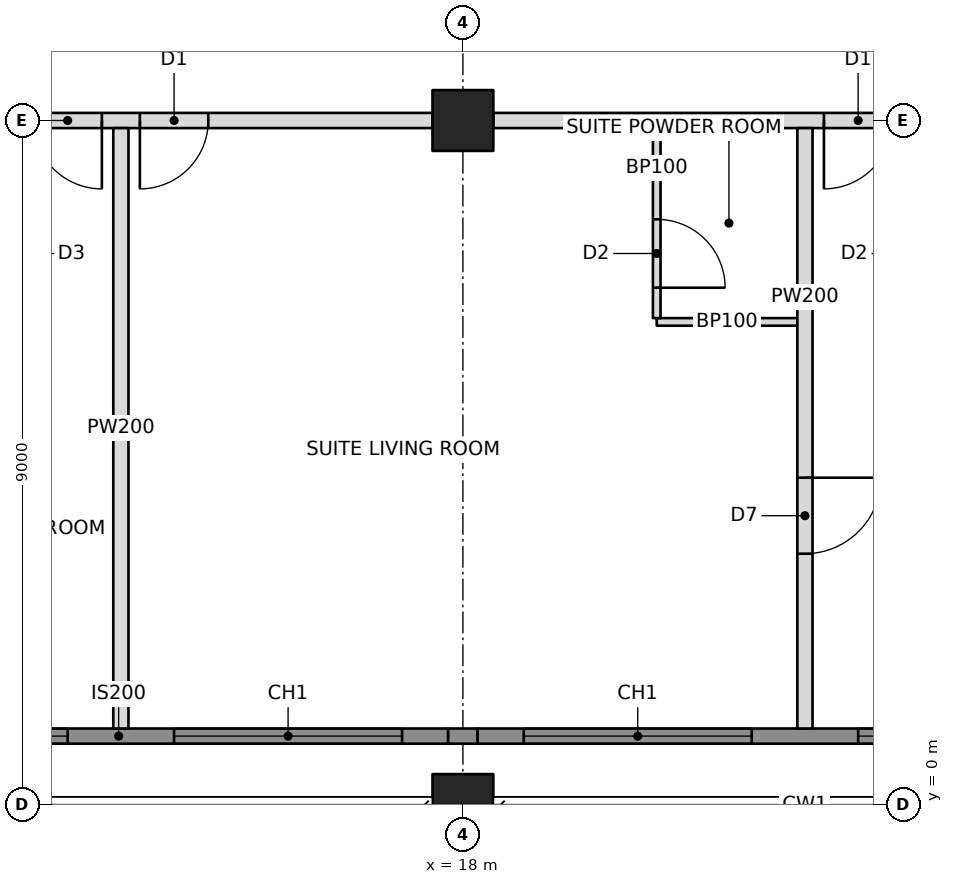
"""IFC4 building model, lengths in metres.
Left out: names, types, materials, properties, quantities, classifications, styles, units other than length and angle.
Written with IfcOpenShell. Run it as: python <this file> out.ifc"""

import sys

from ifc_helpers import new_model, si_unit, direction, frame, frame_2d, origin, origin_2d, place, context, subcontext, project, spatial, rectangle, hollow_rectangle, extrude, element, fill, save


model = new_model("IFC4")
c1 = context("Model", 3, precision=1e-05, world=origin(), true_north=direction((0.0, 1.0)))
c2 = subcontext(c1, "Body", "Model", "MODEL_VIEW")
j1 = project(units=[si_unit("LENGTHUNIT", "METRE"), si_unit("PLANEANGLEUNIT", "RADIAN")], contexts=[c1])
p1 = place(None, origin())
s1 = spatial("IfcSite", under=j1, at=p1, CompositionType="ELEMENT")
p2 = place(p1, origin())
s2 = spatial("IfcBuilding", under=s1, at=p2, CompositionType="ELEMENT")
p3 = place(p2, frame((0.0, 0.0, 194.4)))
s3 = spatial("IfcBuildingStorey", under=s2, at=p3, CompositionType="ELEMENT", Elevation=194.4)
p4 = place(p3, frame((18.0, 0.0, 0.0), z_axis=(0.0, 0.0, 1.0), x_axis=(1.0, 0.0, 0.0)))
e1 = element("IfcColumn", 1, at=p4, inside=s3, PredefinedType="COLUMN", context=c2, shape_type="SweptSolid", body=[
    extrude(hollow_rectangle(XDim=0.8, YDim=0.8, WallThickness=0.06, at=origin_2d()), origin(), (0.0, 0.0, 1.0), 3.4),
])
p5 = place(p3, frame((18.0, 9.0, 0.0), z_axis=(0.0, 0.0, 1.0), x_axis=(1.0, 0.0, 0.0)))
e2 = element("IfcColumn", 2, at=p5, inside=s3, PredefinedType="COLUMN", context=c2, shape_type="SweptSolid", body=[
    extrude(hollow_rectangle(XDim=0.8, YDim=0.8, WallThickness=0.05, at=origin_2d()), origin(), (0.0, 0.0, 1.0), 3.4),
])
p6 = place(p3, frame((9.4, 9.0, 0.0), z_axis=(0.0, 0.0, 1.0), x_axis=(1.0, 0.0, 0.0)))
e3 = element("IfcWall", 3, at=p6, inside=s3, PredefinedType="PARTITIONING", context=c2, shape_type="SweptSolid", body=[
    extrude(rectangle(XDim=8.2, YDim=0.2, at=frame_2d((4.1, 0.0))), origin(), (0.0, 0.0, 1.0), 2.405),
])
p7 = place(p6, frame((2.95, 0.0, 0.0)))
e4 = element("IfcOpeningElement", 4, at=p7, cuts=e3, PredefinedType="OPENING", context=c2, shape_type="SweptSolid", body=[
    extrude(rectangle(XDim=0.9, YDim=2.1, at=frame_2d((0.45, 1.05))), frame((0.0, 0.11, 0.0), z_axis=(0.0, -1.0, 0.0), x_axis=(1.0, 0.0, 0.0)), (0.0, 0.0, 1.0), 0.22),
])
p8 = place(p6, frame((4.35, 0.0, 0.0)))
e5 = element("IfcOpeningElement", 5, at=p8, cuts=e3, PredefinedType="OPENING", context=c2, shape_type="SweptSolid", body=[
    extrude(rectangle(XDim=0.9, YDim=2.1, at=frame_2d((0.45, 1.05))), frame((0.0, 0.11, 0.0), z_axis=(0.0, -1.0, 0.0), x_axis=(1.0, 0.0, 0.0)), (0.0, 0.0, 1.0), 0.22),
])
p9 = place(p3, frame((18.4, 9.0, 0.0), z_axis=(0.0, 0.0, 1.0), x_axis=(1.0, 0.0, 0.0)))
e6 = element("IfcWall", 6, at=p9, inside=s3, PredefinedType="PARTITIONING", context=c2, shape_type="SweptSolid", body=[
    extrude(rectangle(XDim=8.2, YDim=0.2, at=frame_2d((4.1, 0.0))), origin(), (0.0, 0.0, 1.0), 2.405),
])
p10 = place(p9, frame((4.35, 0.0, 0.0)))
e7 = element("IfcOpeningElement", 7, at=p10, cuts=e6, PredefinedType="OPENING", context=c2, shape_type="SweptSolid", body=[
    extrude(rectangle(XDim=0.9, YDim=2.1, at=frame_2d((0.45, 1.05))), frame((0.0, 0.11, 0.0), z_axis=(0.0, -1.0, 0.0), x_axis=(1.0, 0.0, 0.0)), (0.0, 0.0, 1.0), 0.22),
])
p11 = place(p3, frame((13.5, 8.9, 0.0), z_axis=(0.0, 0.0, 1.0), x_axis=(0.0, -1.0, 0.0)))
e8 = element("IfcWall", 8, at=p11, inside=s3, PredefinedType="PARTITIONING", context=c2, shape_type="SweptSolid", body=[
    extrude(rectangle(XDim=7.9, YDim=0.2, at=frame_2d((3.95, 0.0))), origin(), (0.0, 0.0, 1.0), 2.404),
])
p12 = place(p3, frame((22.5, 8.9, 0.0), z_axis=(0.0, 0.0, 1.0), x_axis=(0.0, -1.0, 0.0)))
e9 = element("IfcWall", 9, at=p12, inside=s3, PredefinedType="PARTITIONING", context=c2, shape_type="SweptSolid", body=[
    extrude(rectangle(XDim=7.9, YDim=0.2, at=frame_2d((3.95, 0.0))), origin(), (0.0, 0.0, 1.0), 2.404),
])
p13 = place(p12, frame((4.6, 0.0, 0.0)))
e10 = element("IfcOpeningElement", 10, at=p13, cuts=e9, PredefinedType="OPENING", context=c2, shape_type="SweptSolid", body=[
    extrude(rectangle(XDim=1.0, YDim=2.1, at=frame_2d((0.5, 1.05))), frame((0.0, 0.11, 0.0), z_axis=(0.0, -1.0, 0.0), x_axis=(1.0, 0.0, 0.0)), (0.0, 0.0, 1.0), 0.22),
])
p14 = place(p3, frame((20.55, 6.35, 0.0), z_axis=(0.0, 0.0, 1.0), x_axis=(1.0, 0.0, 0.0)))
e11 = element("IfcWall", 11, at=p14, inside=s3, PredefinedType="PARTITIONING", context=c2, shape_type="SweptSolid", body=[
    extrude(rectangle(XDim=1.85, YDim=0.1, at=frame_2d((0.925, 0.0))), origin(), (0.0, 0.0, 1.0), 3.2),
])
p15 = place(p3, frame((20.55, 8.9, 0.0), z_axis=(0.0, 0.0, 1.0), x_axis=(0.0, -1.0, 0.0)))
e12 = element("IfcWall", 12, at=p15, inside=s3, PredefinedType="PARTITIONING", context=c2, shape_type="SweptSolid", body=[
    extrude(rectangle(XDim=2.5, YDim=0.1, at=frame_2d((1.25, 0.0))), origin(), (0.0, 0.0, 1.0), 2.404),
])
p16 = place(p15, frame((1.2, 0.0, 0.0)))
e13 = element("IfcOpeningElement", 13, at=p16, cuts=e12, PredefinedType="OPENING", context=c2, shape_type="SweptSolid", body=[
    extrude(rectangle(XDim=0.9, YDim=2.1, at=frame_2d((0.45, 1.05))), frame((0.0, 0.06, 0.0), z_axis=(0.0, -1.0, 0.0), x_axis=(1.0, 0.0, 0.0)), (0.0, 0.0, 1.0), 0.12),
])
p17 = place(p3, frame((9.135, 0.9, 0.0), z_axis=(0.0, 0.0, 1.0), x_axis=(1.0, 0.0, 0.0)))
e14 = element("IfcWall", 14, at=p17, inside=s3, PredefinedType="SOLIDWALL", context=c2, shape_type="SweptSolid", body=[
    extrude(rectangle(XDim=8.671, YDim=0.2, at=frame_2d((4.335, 0.0))), origin(), (0.0, 0.0, 1.0), 3.2),
])
p18 = place(p17, frame((0.665, 0.0, 0.6)))
e15 = element("IfcOpeningElement", 15, at=p18, cuts=e14, PredefinedType="OPENING", context=c2, shape_type="SweptSolid", body=[
    extrude(rectangle(XDim=3.0, YDim=2.2, at=frame_2d((1.5, 1.1))), frame((0.0, 0.11, 0.0), z_axis=(0.0, -1.0, 0.0), x_axis=(1.0, 0.0, 0.0)), (0.0, 0.0, 1.0), 0.22),
])
p19 = place(p17, frame((5.065, 0.0, 0.6)))
e16 = element("IfcOpeningElement", 16, at=p19, cuts=e14, PredefinedType="OPENING", context=c2, shape_type="SweptSolid", body=[
    extrude(rectangle(XDim=3.0, YDim=2.2, at=frame_2d((1.5, 1.1))), frame((0.0, 0.11, 0.0), z_axis=(0.0, -1.0, 0.0), x_axis=(1.0, 0.0, 0.0)), (0.0, 0.0, 1.0), 0.22),
])
p20 = place(p3, frame((17.806, 0.9, 0.0), z_axis=(0.0, 0.0, 1.0), x_axis=(1.0, 0.0, 0.0)))
e17 = element("IfcWall", 17, at=p20, inside=s3, PredefinedType="SOLIDWALL", context=c2, shape_type="SweptSolid", body=[
    extrude(rectangle(XDim=0.388, YDim=0.2, at=frame_2d((0.194, 0.0))), origin(), (0.0, 0.0, 1.0), 2.404),
])
p21 = place(p3, frame((18.194, 0.9, 0.0), z_axis=(0.0, 0.0, 1.0), x_axis=(1.0, 0.0, 0.0)))
e18 = element("IfcWall", 18, at=p21, inside=s3, PredefinedType="SOLIDWALL", context=c2, shape_type="SweptSolid", body=[
    extrude(rectangle(XDim=8.612, YDim=0.2, at=frame_2d((4.306, 0.0))), origin(), (0.0, 0.0, 1.0), 3.2),
])
p22 = place(p21, frame((0.606, 0.0, 0.6)))
e19 = element("IfcOpeningElement", 19, at=p22, cuts=e18, PredefinedType="OPENING", context=c2, shape_type="SweptSolid", body=[
    extrude(rectangle(XDim=3.0, YDim=2.2, at=frame_2d((1.5, 1.1))), frame((0.0, 0.11, 0.0), z_axis=(0.0, -1.0, 0.0), x_axis=(1.0, 0.0, 0.0)), (0.0, 0.0, 1.0), 0.22),
])
p23 = place(p21, frame((5.006, 0.0, 0.6)))
e20 = element("IfcOpeningElement", 20, at=p23, cuts=e18, PredefinedType="OPENING", context=c2, shape_type="SweptSolid", body=[
    extrude(rectangle(XDim=3.0, YDim=2.2, at=frame_2d((1.5, 1.1))), frame((0.0, 0.11, 0.0), z_axis=(0.0, -1.0, 0.0), x_axis=(1.0, 0.0, 0.0)), (0.0, 0.0, 1.0), 0.22),
])
p24 = place(p18, origin())
e21 = element("IfcWindow", 21, at=p24, inside=s3, PartitioningType="TRIPLE_PANEL_VERTICAL", PredefinedType="WINDOW", context=c2, shape_type="SweptSolid", body=[
    extrude(rectangle(XDim=3.0, YDim=2.2, at=frame_2d((1.5, 1.1))), frame((0.0, 0.03, 0.0), z_axis=(0.0, -1.0, 0.0), x_axis=(1.0, 0.0, 0.0)), (0.0, 0.0, 1.0), 0.06),
])
fill(e15, e21)
p25 = place(p19, origin())
e22 = element("IfcWindow", 22, at=p25, inside=s3, PartitioningType="TRIPLE_PANEL_VERTICAL", PredefinedType="WINDOW", context=c2, shape_type="SweptSolid", body=[
    extrude(rectangle(XDim=3.0, YDim=2.2, at=frame_2d((1.5, 1.1))), frame((0.0, 0.03, 0.0), z_axis=(0.0, -1.0, 0.0), x_axis=(1.0, 0.0, 0.0)), (0.0, 0.0, 1.0), 0.06),
])
fill(e16, e22)
p26 = place(p22, origin())
e23 = element("IfcWindow", 23, at=p26, inside=s3, PartitioningType="TRIPLE_PANEL_VERTICAL", PredefinedType="WINDOW", context=c2, shape_type="SweptSolid", body=[
    extrude(rectangle(XDim=3.0, YDim=2.2, at=frame_2d((1.5, 1.1))), frame((0.0, 0.03, 0.0), z_axis=(0.0, -1.0, 0.0), x_axis=(1.0, 0.0, 0.0)), (0.0, 0.0, 1.0), 0.06),
])
fill(e19, e23)
p27 = place(p23, origin())
e24 = element("IfcWindow", 24, at=p27, inside=s3, PartitioningType="TRIPLE_PANEL_VERTICAL", PredefinedType="WINDOW", context=c2, shape_type="SweptSolid", body=[
    extrude(rectangle(XDim=3.0, YDim=2.2, at=frame_2d((1.5, 1.1))), frame((0.0, 0.03, 0.0), z_axis=(0.0, -1.0, 0.0), x_axis=(1.0, 0.0, 0.0)), (0.0, 0.0, 1.0), 0.06),
])
fill(e20, e24)
p28 = place(p13, origin())
e25 = element("IfcDoor", 25, at=p28, inside=s3, OperationType="SINGLE_SWING_LEFT", PredefinedType="DOOR", context=c2, shape_type="SweptSolid", body=[
    extrude(rectangle(XDim=1.0, YDim=2.1, at=frame_2d((0.5, 1.05))), frame((0.0, 0.025, 0.0), z_axis=(0.0, -1.0, 0.0), x_axis=(1.0, 0.0, 0.0)), (0.0, 0.0, 1.0), 0.05),
])
fill(e10, e25)
p29 = place(p7, frame((0.9, 0.0, 0.0), z_axis=(0.0, 0.0, 1.0), x_axis=(-1.0, 0.0, 0.0)))
e26 = element("IfcDoor", 26, at=p29, inside=s3, OperationType="SINGLE_SWING_LEFT", PredefinedType="DOOR", context=c2, shape_type="SweptSolid", body=[
    extrude(rectangle(XDim=0.9, YDim=2.1, at=frame_2d((0.45, 1.05))), frame((0.0, 0.025, 0.0), z_axis=(0.0, -1.0, 0.0), x_axis=(1.0, 0.0, 0.0)), (0.0, 0.0, 1.0), 0.05),
])
fill(e4, e26)
p30 = place(p16, origin())
e27 = element("IfcDoor", 27, at=p30, inside=s3, OperationType="SINGLE_SWING_RIGHT", PredefinedType="DOOR", context=c2, shape_type="SweptSolid", body=[
    extrude(rectangle(XDim=0.9, YDim=2.1, at=frame_2d((0.45, 1.05))), frame((0.0, 0.025, 0.0), z_axis=(0.0, -1.0, 0.0), x_axis=(1.0, 0.0, 0.0)), (0.0, 0.0, 1.0), 0.05),
])
fill(e13, e27)
p31 = place(p8, frame((0.9, 0.0, 0.0), z_axis=(0.0, 0.0, 1.0), x_axis=(-1.0, 0.0, 0.0)))
e28 = element("IfcDoor", 28, at=p31, inside=s3, OperationType="SINGLE_SWING_RIGHT", PredefinedType="DOOR", context=c2, shape_type="SweptSolid", body=[
    extrude(rectangle(XDim=0.9, YDim=2.1, at=frame_2d((0.45, 1.05))), frame((0.0, 0.025, 0.0), z_axis=(0.0, -1.0, 0.0), x_axis=(1.0, 0.0, 0.0)), (0.0, 0.0, 1.0), 0.05),
])
fill(e5, e28)
p32 = place(p10, frame((0.9, 0.0, 0.0), z_axis=(0.0, 0.0, 1.0), x_axis=(-1.0, 0.0, 0.0)))
e29 = element("IfcDoor", 29, at=p32, inside=s3, OperationType="SINGLE_SWING_RIGHT", PredefinedType="DOOR", context=c2, shape_type="SweptSolid", body=[
    extrude(rectangle(XDim=0.9, YDim=2.1, at=frame_2d((0.45, 1.05))), frame((0.0, 0.025, 0.0), z_axis=(0.0, -1.0, 0.0), x_axis=(1.0, 0.0, 0.0)), (0.0, 0.0, 1.0), 0.05),
])
fill(e7, e29)
save(model, sys.argv[1])
